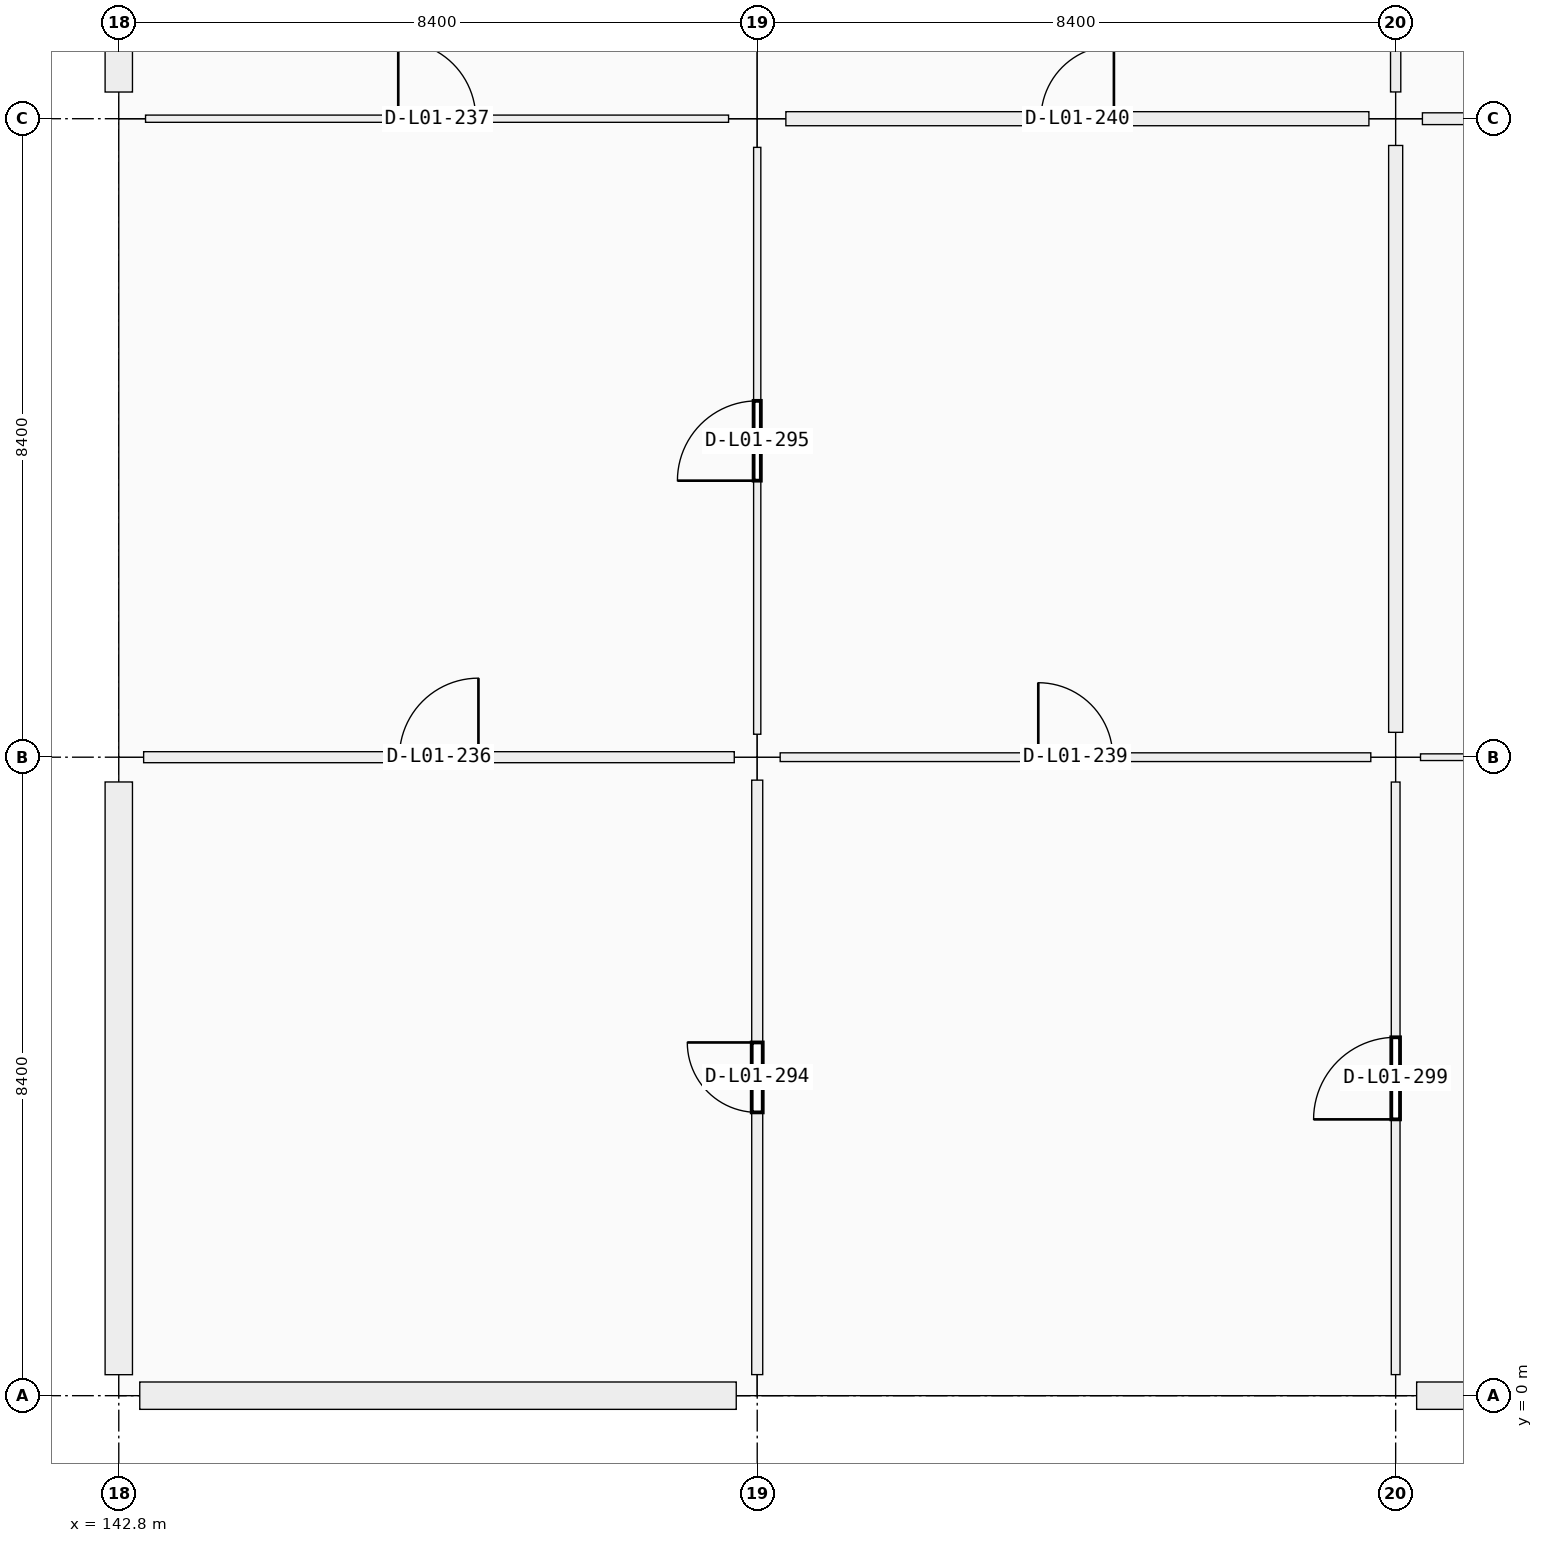
"""IFC4 building model, lengths in metres.
Left out: names, types, materials, properties, quantities, classifications, styles, units other than length and angle.
Written with IfcOpenShell. Run it as: python <this file> out.ifc"""

import sys

from ifc_helpers import new_model, si_unit, direction, frame, frame_2d, origin, origin_2d, place, context, subcontext, project, spatial, rectangle, extrude, element, fill, save


model = new_model("IFC4")
c1 = context("Model", 3, precision=1e-05, world=origin(), true_north=direction((0.0, 1.0)))
c2 = subcontext(c1, "Body", "Model", "MODEL_VIEW")
j1 = project(units=[si_unit("LENGTHUNIT", "METRE"), si_unit("PLANEANGLEUNIT", "RADIAN")], contexts=[c1])
p1 = place(None, origin())
s1 = spatial("IfcSite", under=j1, at=p1, CompositionType="ELEMENT")
p2 = place(p1, origin())
s2 = spatial("IfcBuilding", under=s1, at=p2, CompositionType="ELEMENT")
p3 = place(p2, frame((0.0, 0.0, 5.76)))
s3 = spatial("IfcBuildingStorey", under=s2, at=p3, CompositionType="ELEMENT", Elevation=5.76)
p4 = place(p3, frame((142.8, 0.0, 0.0), z_axis=(0.0, 0.0, 1.0), x_axis=(1.0, 0.0, 0.0)))
e1 = element("IfcColumn", 1, at=p4, inside=s3, PredefinedType="COLUMN", context=c2, shape_type="SweptSolid", body=[
    extrude(rectangle(XDim=0.55, YDim=0.55, at=origin_2d()), origin(), (0.0, 0.0, 1.0), 4.2),
])
p5 = place(p3, frame((142.8, 8.4, 0.0), z_axis=(0.0, 0.0, 1.0), x_axis=(1.0, 0.0, 0.0)))
e2 = element("IfcColumn", 2, at=p5, inside=s3, PredefinedType="COLUMN", context=c2, shape_type="SweptSolid", body=[
    extrude(rectangle(XDim=0.65, YDim=0.65, at=origin_2d()), origin(), (0.0, 0.0, 1.0), 4.5),
])
p6 = place(p3, frame((142.8, 16.8, 0.0), z_axis=(0.0, 0.0, 1.0), x_axis=(1.0, 0.0, 0.0)))
e3 = element("IfcColumn", 3, at=p6, inside=s3, PredefinedType="COLUMN", context=c2, shape_type="SweptSolid", body=[
    extrude(rectangle(XDim=0.7, YDim=0.7, at=origin_2d()), origin(), (0.0, 0.0, 1.0), 4.5),
])
p7 = place(p3, frame((151.2, 0.0, 0.0), z_axis=(0.0, 0.0, 1.0), x_axis=(1.0, 0.0, 0.0)))
e4 = element("IfcColumn", 4, at=p7, inside=s3, PredefinedType="COLUMN", context=c2, shape_type="SweptSolid", body=[
    extrude(rectangle(XDim=0.55, YDim=0.55, at=origin_2d()), origin(), (0.0, 0.0, 1.0), 4.2),
])
p8 = place(p3, frame((151.2, 8.4, 0.0), z_axis=(0.0, 0.0, 1.0), x_axis=(1.0, 0.0, 0.0)))
e5 = element("IfcColumn", 5, at=p8, inside=s3, PredefinedType="COLUMN", context=c2, shape_type="SweptSolid", body=[
    extrude(rectangle(XDim=0.6, YDim=0.6, at=origin_2d()), origin(), (0.0, 0.0, 1.0), 4.5),
])
p9 = place(p3, frame((151.2, 16.8, 0.0), z_axis=(0.0, 0.0, 1.0), x_axis=(1.0, 0.0, 0.0)))
e6 = element("IfcColumn", 6, at=p9, inside=s3, PredefinedType="COLUMN", context=c2, shape_type="SweptSolid", body=[
    extrude(rectangle(XDim=0.75, YDim=0.75, at=origin_2d()), origin(), (0.0, 0.0, 1.0), 4.5),
])
p10 = place(p3, frame((159.6, 0.0, 0.0), z_axis=(0.0, 0.0, 1.0), x_axis=(1.0, 0.0, 0.0)))
e7 = element("IfcColumn", 7, at=p10, inside=s3, PredefinedType="COLUMN", context=c2, shape_type="SweptSolid", body=[
    extrude(rectangle(XDim=0.55, YDim=0.55, at=origin_2d()), origin(), (0.0, 0.0, 1.0), 4.2),
])
p11 = place(p3, frame((159.6, 8.4, 0.0), z_axis=(0.0, 0.0, 1.0), x_axis=(1.0, 0.0, 0.0)))
e8 = element("IfcColumn", 8, at=p11, inside=s3, PredefinedType="COLUMN", context=c2, shape_type="SweptSolid", body=[
    extrude(rectangle(XDim=0.65, YDim=0.65, at=origin_2d()), origin(), (0.0, 0.0, 1.0), 4.5),
])
p12 = place(p3, frame((159.6, 16.8, 0.0), z_axis=(0.0, 0.0, 1.0), x_axis=(1.0, 0.0, 0.0)))
e9 = element("IfcColumn", 9, at=p12, inside=s3, PredefinedType="COLUMN", context=c2, shape_type="SweptSolid", body=[
    extrude(rectangle(XDim=0.7, YDim=0.7, at=origin_2d()), origin(), (0.0, 0.0, 1.0), 4.5),
])
p13 = place(p3, frame((150.924, 0.0, 0.0), z_axis=(0.0, 0.0, 1.0), x_axis=(-1.0, 0.0, 0.0)))
e10 = element("IfcWall", 10, at=p13, inside=s3, PredefinedType="SOLIDWALL", context=c2, shape_type="SweptSolid", body=[
    extrude(rectangle(XDim=7.848, YDim=0.36, at=frame_2d((3.924, 0.0))), origin(), (0.0, 0.0, 1.0), 3.4),
])
p14 = place(p3, frame((142.8, 0.276, 0.0), z_axis=(0.0, 0.0, 1.0), x_axis=(0.0, 1.0, 0.0)))
e11 = element("IfcWall", 11, at=p14, inside=s3, PredefinedType="SOLIDWALL", context=c2, shape_type="SweptSolid", body=[
    extrude(rectangle(XDim=7.798, YDim=0.36, at=frame_2d((3.899, 0.0))), origin(), (0.0, 0.0, 1.0), 3.4),
])
p15 = place(p14, frame((3.224, 0.0, 0.9)))
e12 = element("IfcOpeningElement", 12, at=p15, cuts=e11, PredefinedType="OPENING", context=c2, shape_type="SweptSolid", body=[
    extrude(rectangle(XDim=1.35, YDim=1.5, at=frame_2d((0.675, 0.75))), frame((0.0, 0.18, 0.0), z_axis=(0.0, -1.0, 0.0), x_axis=(1.0, 0.0, 0.0)), (0.0, 0.0, 1.0), 0.36),
])
p16 = place(p3, frame((142.8, 17.151, 0.0), z_axis=(0.0, 0.0, 1.0), x_axis=(0.0, 1.0, 0.0)))
e13 = element("IfcWall", 13, at=p16, inside=s3, PredefinedType="SOLIDWALL", context=c2, shape_type="SweptSolid", body=[
    extrude(rectangle(XDim=7.673, YDim=0.36, at=frame_2d((3.836, 0.0))), origin(), (0.0, 0.0, 1.0), 3.4),
])
p17 = place(p16, frame((3.287, 0.0, 0.9)))
e14 = element("IfcOpeningElement", 14, at=p17, cuts=e13, PredefinedType="OPENING", context=c2, shape_type="SweptSolid", body=[
    extrude(rectangle(XDim=1.1, YDim=1.5, at=frame_2d((0.55, 0.75))), frame((0.0, 0.18, 0.0), z_axis=(0.0, -1.0, 0.0), x_axis=(1.0, 0.0, 0.0)), (0.0, 0.0, 1.0), 0.36),
])
p18 = place(p3, frame((167.724, 0.0, 0.0), z_axis=(0.0, 0.0, 1.0), x_axis=(-1.0, 0.0, 0.0)))
e15 = element("IfcWall", 15, at=p18, inside=s3, PredefinedType="SOLIDWALL", context=c2, shape_type="SweptSolid", body=[
    extrude(rectangle(XDim=7.848, YDim=0.36, at=frame_2d((3.924, 0.0))), origin(), (0.0, 0.0, 1.0), 3.4),
])
p19 = place(p18, frame((3.199, 0.0, 0.9)))
e16 = element("IfcOpeningElement", 16, at=p19, cuts=e15, PredefinedType="OPENING", context=c2, shape_type="SweptSolid", body=[
    extrude(rectangle(XDim=1.45, YDim=1.85, at=frame_2d((0.725, 0.925))), frame((0.0, 0.18, 0.0), z_axis=(0.0, -1.0, 0.0), x_axis=(1.0, 0.0, 0.0)), (0.0, 0.0, 1.0), 0.36),
])
p20 = place(p3, frame((143.127, 8.4, 0.0), z_axis=(0.0, 0.0, 1.0), x_axis=(1.0, 0.0, 0.0)))
e17 = element("IfcWall", 17, at=p20, inside=s3, PredefinedType="PARTITIONING", context=c2, shape_type="SweptSolid", body=[
    extrude(rectangle(XDim=7.771, YDim=0.145, at=frame_2d((3.885, 0.0))), origin(), (0.0, 0.0, 1.0), 2.4),
])
p21 = place(p20, frame((3.365, 0.0, 0.0)))
e18 = element("IfcOpeningElement", 18, at=p21, cuts=e17, PredefinedType="OPENING", context=c2, shape_type="SweptSolid", body=[
    extrude(rectangle(XDim=1.04, YDim=2.2, at=frame_2d((0.52, 1.1))), frame((0.0, 0.073, 0.0), z_axis=(0.0, -1.0, 0.0), x_axis=(1.0, 0.0, 0.0)), (0.0, 0.0, 1.0), 0.145),
])
p22 = place(p3, frame((143.152, 16.8, 0.0), z_axis=(0.0, 0.0, 1.0), x_axis=(1.0, 0.0, 0.0)))
e19 = element("IfcWall", 19, at=p22, inside=s3, PredefinedType="PARTITIONING", context=c2, shape_type="SweptSolid", body=[
    extrude(rectangle(XDim=7.671, YDim=0.095, at=frame_2d((3.835, 0.0))), origin(), (0.0, 0.0, 1.0), 2.4),
])
p23 = place(p22, frame((3.325, 0.0, 0.0)))
e20 = element("IfcOpeningElement", 20, at=p23, cuts=e19, PredefinedType="OPENING", context=c2, shape_type="SweptSolid", body=[
    extrude(rectangle(XDim=1.02, YDim=2.2, at=frame_2d((0.51, 1.1))), frame((0.0, 0.047, 0.0), z_axis=(0.0, -1.0, 0.0), x_axis=(1.0, 0.0, 0.0)), (0.0, 0.0, 1.0), 0.095),
])
p24 = place(p3, frame((151.502, 8.4, 0.0), z_axis=(0.0, 0.0, 1.0), x_axis=(1.0, 0.0, 0.0)))
e21 = element("IfcWall", 21, at=p24, inside=s3, PredefinedType="PARTITIONING", context=c2, shape_type="SweptSolid", body=[
    extrude(rectangle(XDim=7.771, YDim=0.115, at=frame_2d((3.885, 0.0))), origin(), (0.0, 0.0, 1.0), 2.4),
])
p25 = place(p24, frame((3.396, 0.0, 0.0)))
e22 = element("IfcOpeningElement", 22, at=p25, cuts=e21, PredefinedType="OPENING", context=c2, shape_type="SweptSolid", body=[
    extrude(rectangle(XDim=0.98, YDim=2.18, at=frame_2d((0.49, 1.09))), frame((0.0, 0.058, 0.0), z_axis=(0.0, -1.0, 0.0), x_axis=(1.0, 0.0, 0.0)), (0.0, 0.0, 1.0), 0.115),
])
p26 = place(p3, frame((151.577, 16.8, 0.0), z_axis=(0.0, 0.0, 1.0), x_axis=(1.0, 0.0, 0.0)))
e23 = element("IfcWall", 23, at=p26, inside=s3, PredefinedType="PARTITIONING", context=c2, shape_type="SweptSolid", body=[
    extrude(rectangle(XDim=7.671, YDim=0.185, at=frame_2d((3.835, 0.0))), origin(), (0.0, 0.0, 1.0), 2.4),
])
p27 = place(p26, frame((3.356, 0.0, 0.0)))
e24 = element("IfcOpeningElement", 24, at=p27, cuts=e23, PredefinedType="OPENING", context=c2, shape_type="SweptSolid", body=[
    extrude(rectangle(XDim=0.96, YDim=2.18, at=frame_2d((0.48, 1.09))), frame((0.0, 0.093, 0.0), z_axis=(0.0, -1.0, 0.0), x_axis=(1.0, 0.0, 0.0)), (0.0, 0.0, 1.0), 0.185),
])
p28 = place(p3, frame((159.927, 8.4, 0.0), z_axis=(0.0, 0.0, 1.0), x_axis=(1.0, 0.0, 0.0)))
e25 = element("IfcWall", 25, at=p28, inside=s3, PredefinedType="PARTITIONING", context=c2, shape_type="SweptSolid", body=[
    extrude(rectangle(XDim=7.771, YDim=0.088, at=frame_2d((3.885, 0.0))), origin(), (0.0, 0.0, 1.0), 2.4),
])
p29 = place(p28, frame((3.381, 0.0, 0.0)))
e26 = element("IfcOpeningElement", 26, at=p29, cuts=e25, PredefinedType="OPENING", context=c2, shape_type="SweptSolid", body=[
    extrude(rectangle(XDim=1.01, YDim=2.12, at=frame_2d((0.505, 1.06))), frame((0.0, 0.044, 0.0), z_axis=(0.0, -1.0, 0.0), x_axis=(1.0, 0.0, 0.0)), (0.0, 0.0, 1.0), 0.088),
])
p30 = place(p3, frame((159.952, 16.8, 0.0), z_axis=(0.0, 0.0, 1.0), x_axis=(1.0, 0.0, 0.0)))
e27 = element("IfcWall", 27, at=p30, inside=s3, PredefinedType="PARTITIONING", context=c2, shape_type="SweptSolid", body=[
    extrude(rectangle(XDim=7.671, YDim=0.155, at=frame_2d((3.835, 0.0))), origin(), (0.0, 0.0, 1.0), 2.4),
])
p31 = place(p30, frame((3.325, 0.0, 0.0)))
e28 = element("IfcOpeningElement", 28, at=p31, cuts=e27, PredefinedType="OPENING", context=c2, shape_type="SweptSolid", body=[
    extrude(rectangle(XDim=1.02, YDim=2.2, at=frame_2d((0.51, 1.1))), frame((0.0, 0.078, 0.0), z_axis=(0.0, -1.0, 0.0), x_axis=(1.0, 0.0, 0.0)), (0.0, 0.0, 1.0), 0.155),
])
p32 = place(p3, frame((151.2, 0.277, 0.0), z_axis=(0.0, 0.0, 1.0), x_axis=(0.0, 1.0, 0.0)))
e29 = element("IfcWall", 29, at=p32, inside=s3, PredefinedType="PARTITIONING", context=c2, shape_type="SweptSolid", body=[
    extrude(rectangle(XDim=7.821, YDim=0.145, at=frame_2d((3.91, 0.0))), origin(), (0.0, 0.0, 1.0), 2.4),
])
p33 = place(p32, frame((3.45, 0.0, 0.0)))
e30 = element("IfcOpeningElement", 30, at=p33, cuts=e29, PredefinedType="OPENING", context=c2, shape_type="SweptSolid", body=[
    extrude(rectangle(XDim=0.92, YDim=2.15, at=frame_2d((0.46, 1.075))), frame((0.0, 0.073, 0.0), z_axis=(0.0, -1.0, 0.0), x_axis=(1.0, 0.0, 0.0)), (0.0, 0.0, 1.0), 0.145),
])
p34 = place(p3, frame((151.2, 8.702, 0.0), z_axis=(0.0, 0.0, 1.0), x_axis=(0.0, 1.0, 0.0)))
e31 = element("IfcWall", 31, at=p34, inside=s3, PredefinedType="PARTITIONING", context=c2, shape_type="SweptSolid", body=[
    extrude(rectangle(XDim=7.721, YDim=0.095, at=frame_2d((3.861, 0.0))), origin(), (0.0, 0.0, 1.0), 2.4),
])
p35 = place(p34, frame((3.336, 0.0, 0.0)))
e32 = element("IfcOpeningElement", 32, at=p35, cuts=e31, PredefinedType="OPENING", context=c2, shape_type="SweptSolid", body=[
    extrude(rectangle(XDim=1.05, YDim=2.12, at=frame_2d((0.525, 1.06))), frame((0.0, 0.047, 0.0), z_axis=(0.0, -1.0, 0.0), x_axis=(1.0, 0.0, 0.0)), (0.0, 0.0, 1.0), 0.095),
])
p36 = place(p3, frame((159.6, 0.277, 0.0), z_axis=(0.0, 0.0, 1.0), x_axis=(0.0, 1.0, 0.0)))
e33 = element("IfcWall", 33, at=p36, inside=s3, PredefinedType="PARTITIONING", context=c2, shape_type="SweptSolid", body=[
    extrude(rectangle(XDim=7.796, YDim=0.115, at=frame_2d((3.898, 0.0))), origin(), (0.0, 0.0, 1.0), 2.4),
])
p37 = place(p36, frame((3.358, 0.0, 0.0)))
e34 = element("IfcOpeningElement", 34, at=p37, cuts=e33, PredefinedType="OPENING", context=c2, shape_type="SweptSolid", body=[
    extrude(rectangle(XDim=1.08, YDim=2.22, at=frame_2d((0.54, 1.11))), frame((0.0, 0.058, 0.0), z_axis=(0.0, -1.0, 0.0), x_axis=(1.0, 0.0, 0.0)), (0.0, 0.0, 1.0), 0.115),
])
p38 = place(p3, frame((159.6, 8.727, 0.0), z_axis=(0.0, 0.0, 1.0), x_axis=(0.0, 1.0, 0.0)))
e35 = element("IfcWall", 35, at=p38, inside=s3, PredefinedType="PARTITIONING", context=c2, shape_type="SweptSolid", body=[
    extrude(rectangle(XDim=7.721, YDim=0.185, at=frame_2d((3.86, 0.0))), origin(), (0.0, 0.0, 1.0), 2.4),
])
p39 = place(p38, frame((3.33, 0.0, 0.0)))
e36 = element("IfcOpeningElement", 36, at=p39, cuts=e35, PredefinedType="OPENING", context=c2, shape_type="SweptSolid", body=[
    extrude(rectangle(XDim=1.06, YDim=2.22, at=frame_2d((0.53, 1.11))), frame((0.0, 0.093, 0.0), z_axis=(0.0, -1.0, 0.0), x_axis=(1.0, 0.0, 0.0)), (0.0, 0.0, 1.0), 0.185),
])
p40 = place(p3, frame((159.6, 17.152, 0.0), z_axis=(0.0, 0.0, 1.0), x_axis=(0.0, 1.0, 0.0)))
e37 = element("IfcWall", 37, at=p40, inside=s3, PredefinedType="PARTITIONING", context=c2, shape_type="SweptSolid", body=[
    extrude(rectangle(XDim=7.671, YDim=0.135, at=frame_2d((3.835, 0.0))), origin(), (0.0, 0.0, 1.0), 2.4),
])
p41 = place(p40, frame((3.331, 0.0, 0.0)))
e38 = element("IfcOpeningElement", 38, at=p41, cuts=e37, PredefinedType="OPENING", context=c2, shape_type="SweptSolid", body=[
    extrude(rectangle(XDim=1.01, YDim=2.12, at=frame_2d((0.505, 1.06))), frame((0.0, 0.067, 0.0), z_axis=(0.0, -1.0, 0.0), x_axis=(1.0, 0.0, 0.0)), (0.0, 0.0, 1.0), 0.135),
])
p42 = place(p15, origin())
e39 = element("IfcWindow", 39, at=p42, inside=s3, PartitioningType="SINGLE_PANEL", PredefinedType="WINDOW", context=c2, shape_type="SweptSolid", body=[
    extrude(rectangle(XDim=1.35, YDim=1.5, at=frame_2d((0.675, 0.75))), frame((0.0, 0.03, 0.0), z_axis=(0.0, -1.0, 0.0), x_axis=(1.0, 0.0, 0.0)), (0.0, 0.0, 1.0), 0.06),
])
fill(e12, e39)
p43 = place(p21, origin())
e40 = element("IfcDoor", 40, at=p43, inside=s3, OperationType="SINGLE_SWING_RIGHT", PredefinedType="DOOR", context=c2, shape_type="SweptSolid", body=[
    extrude(rectangle(XDim=1.04, YDim=2.2, at=frame_2d((0.52, 1.1))), frame((0.0, 0.025, 0.0), z_axis=(0.0, -1.0, 0.0), x_axis=(1.0, 0.0, 0.0)), (0.0, 0.0, 1.0), 0.05),
])
fill(e18, e40)
p44 = place(p23, origin())
e41 = element("IfcDoor", 41, at=p44, inside=s3, OperationType="SINGLE_SWING_LEFT", PredefinedType="DOOR", context=c2, shape_type="SweptSolid", body=[
    extrude(rectangle(XDim=1.02, YDim=2.2, at=frame_2d((0.51, 1.1))), frame((0.0, 0.025, 0.0), z_axis=(0.0, -1.0, 0.0), x_axis=(1.0, 0.0, 0.0)), (0.0, 0.0, 1.0), 0.05),
])
fill(e20, e41)
p45 = place(p25, origin())
e42 = element("IfcDoor", 42, at=p45, inside=s3, OperationType="SINGLE_SWING_LEFT", PredefinedType="DOOR", context=c2, shape_type="SweptSolid", body=[
    extrude(rectangle(XDim=0.98, YDim=2.18, at=frame_2d((0.49, 1.09))), frame((0.0, 0.025, 0.0), z_axis=(0.0, -1.0, 0.0), x_axis=(1.0, 0.0, 0.0)), (0.0, 0.0, 1.0), 0.05),
])
fill(e22, e42)
p46 = place(p27, origin())
e43 = element("IfcDoor", 43, at=p46, inside=s3, OperationType="SINGLE_SWING_RIGHT", PredefinedType="DOOR", context=c2, shape_type="SweptSolid", body=[
    extrude(rectangle(XDim=0.96, YDim=2.18, at=frame_2d((0.48, 1.09))), frame((0.0, 0.025, 0.0), z_axis=(0.0, -1.0, 0.0), x_axis=(1.0, 0.0, 0.0)), (0.0, 0.0, 1.0), 0.05),
])
fill(e24, e43)
p47 = place(p33, origin())
e44 = element("IfcDoor", 44, at=p47, inside=s3, OperationType="SINGLE_SWING_RIGHT", PredefinedType="DOOR", context=c2, shape_type="SweptSolid", body=[
    extrude(rectangle(XDim=0.92, YDim=2.15, at=frame_2d((0.46, 1.075))), frame((0.0, 0.025, 0.0), z_axis=(0.0, -1.0, 0.0), x_axis=(1.0, 0.0, 0.0)), (0.0, 0.0, 1.0), 0.05),
])
fill(e30, e44)
p48 = place(p35, origin())
e45 = element("IfcDoor", 45, at=p48, inside=s3, OperationType="SINGLE_SWING_LEFT", PredefinedType="DOOR", context=c2, shape_type="SweptSolid", body=[
    extrude(rectangle(XDim=1.05, YDim=2.12, at=frame_2d((0.525, 1.06))), frame((0.0, 0.025, 0.0), z_axis=(0.0, -1.0, 0.0), x_axis=(1.0, 0.0, 0.0)), (0.0, 0.0, 1.0), 0.05),
])
fill(e32, e45)
p49 = place(p37, origin())
e46 = element("IfcDoor", 46, at=p49, inside=s3, OperationType="SINGLE_SWING_LEFT", PredefinedType="DOOR", context=c2, shape_type="SweptSolid", body=[
    extrude(rectangle(XDim=1.08, YDim=2.22, at=frame_2d((0.54, 1.11))), frame((0.0, 0.025, 0.0), z_axis=(0.0, -1.0, 0.0), x_axis=(1.0, 0.0, 0.0)), (0.0, 0.0, 1.0), 0.05),
])
fill(e34, e46)
p50 = place(p39, origin())
e47 = element("IfcDoor", 47, at=p50, inside=s3, OperationType="SINGLE_SWING_RIGHT", PredefinedType="DOOR", context=c2, shape_type="SweptSolid", body=[
    extrude(rectangle(XDim=1.06, YDim=2.22, at=frame_2d((0.53, 1.11))), frame((0.0, 0.025, 0.0), z_axis=(0.0, -1.0, 0.0), x_axis=(1.0, 0.0, 0.0)), (0.0, 0.0, 1.0), 0.05),
])
fill(e36, e47)
save(model, sys.argv[1])
